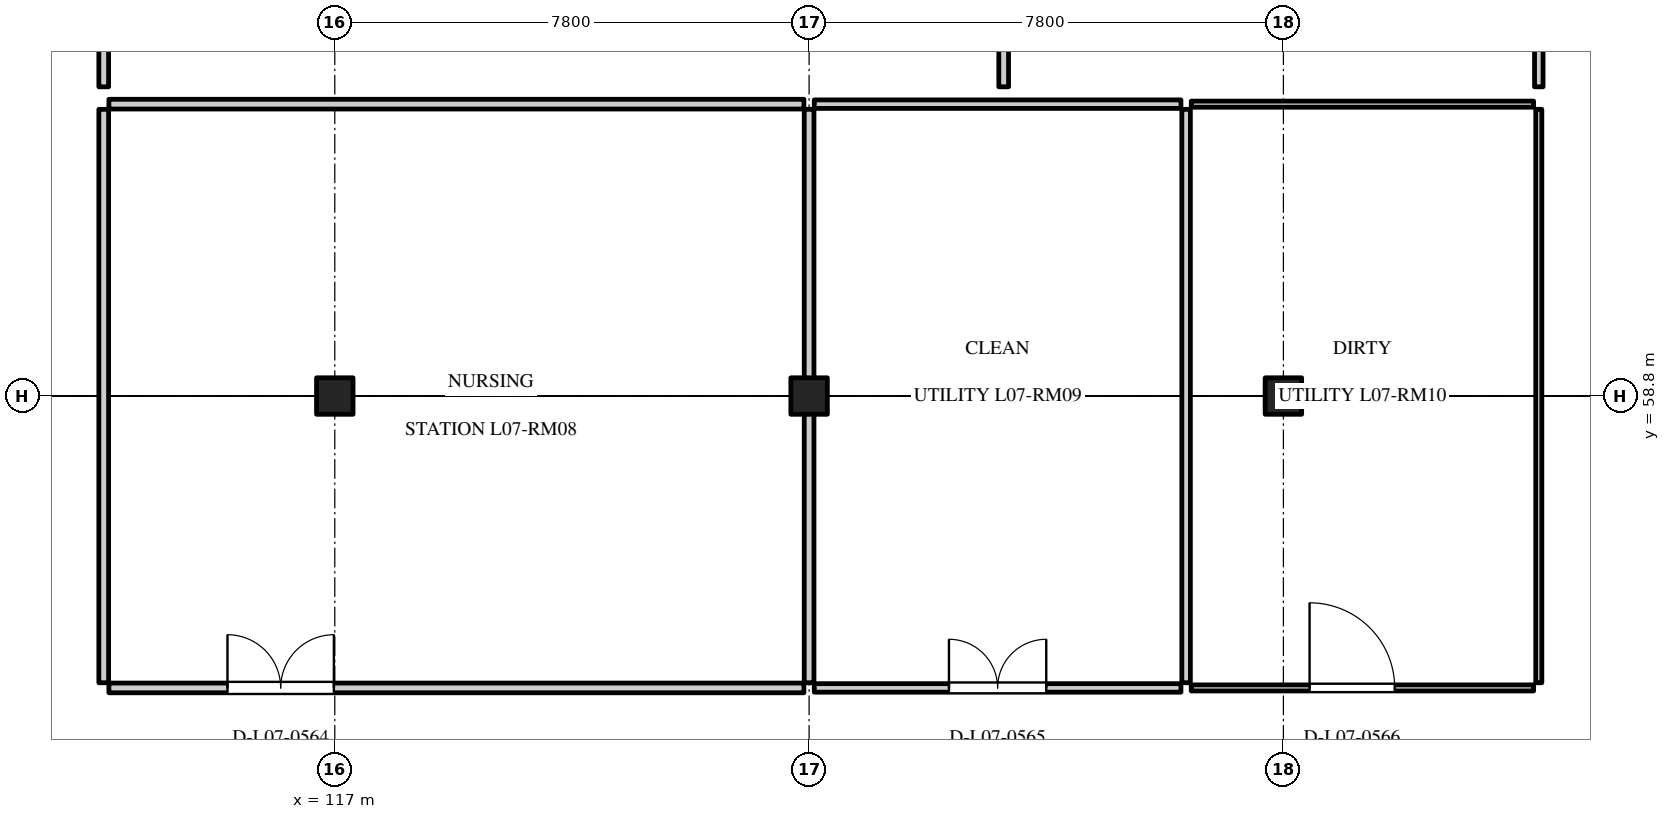
"""IFC4 building model, lengths in metres.
Left out: names, types, materials, properties, quantities, classifications, styles, units other than length and angle.
Written with IfcOpenShell. Run it as: python <this file> out.ifc"""

import sys

from ifc_helpers import new_model, si_unit, direction, frame, frame_2d, origin, origin_2d, place, context, subcontext, project, spatial, rectangle, extrude, element, fill, save


model = new_model("IFC4")
c1 = context("Model", 3, precision=1e-05, world=origin(), true_north=direction((0.0, 1.0)))
c2 = subcontext(c1, "Body", "Model", "MODEL_VIEW")
j1 = project(units=[si_unit("LENGTHUNIT", "METRE"), si_unit("PLANEANGLEUNIT", "RADIAN")], contexts=[c1])
p1 = place(None, origin())
s1 = spatial("IfcSite", under=j1, at=p1, CompositionType="ELEMENT")
p2 = place(p1, origin())
s2 = spatial("IfcBuilding", under=s1, at=p2, CompositionType="ELEMENT")
p3 = place(p2, frame((0.0, 0.0, 29.7)))
s3 = spatial("IfcBuildingStorey", under=s2, at=p3, CompositionType="ELEMENT", Elevation=29.7)
for number, where, z_axis, x_axis in (
    (1, (117.0, 58.8, 0.0), (0.0, 0.0, 1.0), (1.0, 0.0, 0.0)),
    (2, (124.8, 58.8, 0.0), (0.0, 0.0, 1.0), (1.0, 0.0, 0.0)),
    (3, (132.6, 58.8, 0.0), (0.0, 0.0, 1.0), (1.0, 0.0, 0.0)),
):
    element("IfcColumn", number, at=place(p3, frame(where, z_axis=z_axis, x_axis=x_axis)), inside=s3, PredefinedType="COLUMN", context=c2, shape_type="SweptSolid", body=[
        extrude(rectangle(XDim=0.6, YDim=0.6, at=origin_2d()), origin(), (0.0, 0.0, 1.0), 4.2),
    ])
p4 = place(p3, frame((113.285, 54.0, 0.0), z_axis=(0.0, 0.0, 1.0), x_axis=(1.0, 0.0, 0.0)))
e4 = element("IfcWall", 4, at=p4, inside=s3, PredefinedType="PARTITIONING", context=c2, shape_type="SweptSolid", body=[
    extrude(rectangle(XDim=11.43, YDim=0.16, at=frame_2d((5.715, 0.0))), origin(), (0.0, 0.0, 1.0), 3.88),
])
p5 = place(p4, frame((1.95, 0.0, 0.0)))
e5 = element("IfcOpeningElement", 5, at=p5, cuts=e4, PredefinedType="OPENING", context=c2, shape_type="SweptSolid", body=[
    extrude(rectangle(XDim=1.75, YDim=2.3, at=frame_2d((0.875, 1.15))), frame((0.0, 0.092, 0.0), z_axis=(0.0, -1.0, 0.0), x_axis=(1.0, 0.0, 0.0)), (0.0, 0.0, 1.0), 0.184),
])
p6 = place(p3, frame((113.285, 63.6, 0.0), z_axis=(0.0, 0.0, 1.0), x_axis=(1.0, 0.0, 0.0)))
e6 = element("IfcWall", 6, at=p6, inside=s3, PredefinedType="PARTITIONING", context=c2, shape_type="SweptSolid", body=[
    extrude(rectangle(XDim=11.43, YDim=0.16, at=frame_2d((5.715, 0.0))), origin(), (0.0, 0.0, 1.0), 3.88),
])
for number, where, z_axis, x_axis in (
    (7, (113.2, 54.085, 0.0), (0.0, 0.0, 1.0), (0.0, 1.0, 0.0)),
    (8, (124.8, 54.085, 0.0), (0.0, 0.0, 1.0), (0.0, 1.0, 0.0)),
):
    element("IfcWall", number, at=place(p3, frame(where, z_axis=z_axis, x_axis=x_axis)), inside=s3, PredefinedType="PARTITIONING", context=c2, shape_type="SweptSolid", body=[
        extrude(rectangle(XDim=9.43, YDim=0.16, at=frame_2d((4.715, 0.0))), origin(), (0.0, 0.0, 1.0), 3.88),
    ])
p7 = place(p3, frame((124.885, 54.0, 0.0), z_axis=(0.0, 0.0, 1.0), x_axis=(1.0, 0.0, 0.0)))
e9 = element("IfcWall", 9, at=p7, inside=s3, PredefinedType="PARTITIONING", context=c2, shape_type="SweptSolid", body=[
    extrude(rectangle(XDim=6.03, YDim=0.14, at=frame_2d((3.015, 0.0))), origin(), (0.0, 0.0, 1.0), 3.88),
])
p8 = place(p7, frame((2.215, 0.0, 0.0)))
e10 = element("IfcOpeningElement", 10, at=p8, cuts=e9, PredefinedType="OPENING", context=c2, shape_type="SweptSolid", body=[
    extrude(rectangle(XDim=1.6, YDim=2.25, at=frame_2d((0.8, 1.125))), frame((0.0, 0.082, 0.0), z_axis=(0.0, -1.0, 0.0), x_axis=(1.0, 0.0, 0.0)), (0.0, 0.0, 1.0), 0.164),
])
p9 = place(p3, frame((124.885, 63.6, 0.0), z_axis=(0.0, 0.0, 1.0), x_axis=(1.0, 0.0, 0.0)))
e11 = element("IfcWall", 11, at=p9, inside=s3, PredefinedType="PARTITIONING", context=c2, shape_type="SweptSolid", body=[
    extrude(rectangle(XDim=6.03, YDim=0.14, at=frame_2d((3.015, 0.0))), origin(), (0.0, 0.0, 1.0), 3.88),
])
p10 = place(p3, frame((131.0, 54.085, 0.0), z_axis=(0.0, 0.0, 1.0), x_axis=(0.0, 1.0, 0.0)))
e12 = element("IfcWall", 12, at=p10, inside=s3, PredefinedType="PARTITIONING", context=c2, shape_type="SweptSolid", body=[
    extrude(rectangle(XDim=9.43, YDim=0.14, at=frame_2d((4.715, 0.0))), origin(), (0.0, 0.0, 1.0), 3.88),
])
p11 = place(p3, frame((131.085, 54.0, 0.0), z_axis=(0.0, 0.0, 1.0), x_axis=(1.0, 0.0, 0.0)))
e13 = element("IfcWall", 13, at=p11, inside=s3, PredefinedType="PARTITIONING", context=c2, shape_type="SweptSolid", body=[
    extrude(rectangle(XDim=5.63, YDim=0.1, at=frame_2d((2.815, 0.0))), origin(), (0.0, 0.0, 1.0), 3.88),
])
p12 = place(p11, frame((1.946, 0.0, 0.0)))
e14 = element("IfcOpeningElement", 14, at=p12, cuts=e13, PredefinedType="OPENING", context=c2, shape_type="SweptSolid", body=[
    extrude(rectangle(XDim=1.4, YDim=2.25, at=frame_2d((0.7, 1.125))), frame((0.0, 0.062, 0.0), z_axis=(0.0, -1.0, 0.0), x_axis=(1.0, 0.0, 0.0)), (0.0, 0.0, 1.0), 0.124),
])
p13 = place(p3, frame((131.085, 63.6, 0.0), z_axis=(0.0, 0.0, 1.0), x_axis=(1.0, 0.0, 0.0)))
e15 = element("IfcWall", 15, at=p13, inside=s3, PredefinedType="PARTITIONING", context=c2, shape_type="SweptSolid", body=[
    extrude(rectangle(XDim=5.63, YDim=0.1, at=frame_2d((2.815, 0.0))), origin(), (0.0, 0.0, 1.0), 3.88),
])
p14 = place(p3, frame((136.8, 54.085, 0.0), z_axis=(0.0, 0.0, 1.0), x_axis=(0.0, 1.0, 0.0)))
e16 = element("IfcWall", 16, at=p14, inside=s3, PredefinedType="PARTITIONING", context=c2, shape_type="SweptSolid", body=[
    extrude(rectangle(XDim=9.43, YDim=0.1, at=frame_2d((4.715, 0.0))), origin(), (0.0, 0.0, 1.0), 3.88),
])
for number, where, z_axis, x_axis in (
    (17, (113.2, 63.885, 0.0), (0.0, 0.0, 1.0), (0.0, 1.0, 0.0)),
    (18, (128.0, 63.885, 0.0), (0.0, 0.0, 1.0), (0.0, 1.0, 0.0)),
):
    element("IfcWall", number, at=place(p3, frame(where, z_axis=z_axis, x_axis=x_axis)), inside=s3, PredefinedType="PARTITIONING", context=c2, shape_type="SweptSolid", body=[
        extrude(rectangle(XDim=8.03, YDim=0.16, at=frame_2d((4.015, 0.0))), origin(), (0.0, 0.0, 1.0), 3.88),
    ])
p15 = place(p3, frame((136.8, 63.885, 0.0), z_axis=(0.0, 0.0, 1.0), x_axis=(0.0, 1.0, 0.0)))
e19 = element("IfcWall", 19, at=p15, inside=s3, PredefinedType="PARTITIONING", context=c2, shape_type="SweptSolid", body=[
    extrude(rectangle(XDim=8.03, YDim=0.14, at=frame_2d((4.015, 0.0))), origin(), (0.0, 0.0, 1.0), 3.88),
])
p16 = place(p5, origin())
e20 = element("IfcDoor", 20, at=p16, inside=s3, OperationType="DOUBLE_DOOR_SINGLE_SWING", PredefinedType="DOOR", context=c2, shape_type="SweptSolid", body=[
    extrude(rectangle(XDim=1.75, YDim=2.3, at=frame_2d((0.875, 1.15))), frame((0.0, 0.025, 0.0), z_axis=(0.0, -1.0, 0.0), x_axis=(1.0, 0.0, 0.0)), (0.0, 0.0, 1.0), 0.05),
])
fill(e5, e20)
p17 = place(p8, origin())
e21 = element("IfcDoor", 21, at=p17, inside=s3, OperationType="DOUBLE_DOOR_SINGLE_SWING", PredefinedType="DOOR", context=c2, shape_type="SweptSolid", body=[
    extrude(rectangle(XDim=1.6, YDim=2.25, at=frame_2d((0.8, 1.125))), frame((0.0, 0.025, 0.0), z_axis=(0.0, -1.0, 0.0), x_axis=(1.0, 0.0, 0.0)), (0.0, 0.0, 1.0), 0.05),
])
fill(e10, e21)
p18 = place(p12, origin())
e22 = element("IfcDoor", 22, at=p18, inside=s3, OperationType="SINGLE_SWING_LEFT", PredefinedType="DOOR", context=c2, shape_type="SweptSolid", body=[
    extrude(rectangle(XDim=1.4, YDim=2.25, at=frame_2d((0.7, 1.125))), frame((0.0, 0.025, 0.0), z_axis=(0.0, -1.0, 0.0), x_axis=(1.0, 0.0, 0.0)), (0.0, 0.0, 1.0), 0.05),
])
fill(e14, e22)
save(model, sys.argv[1])
